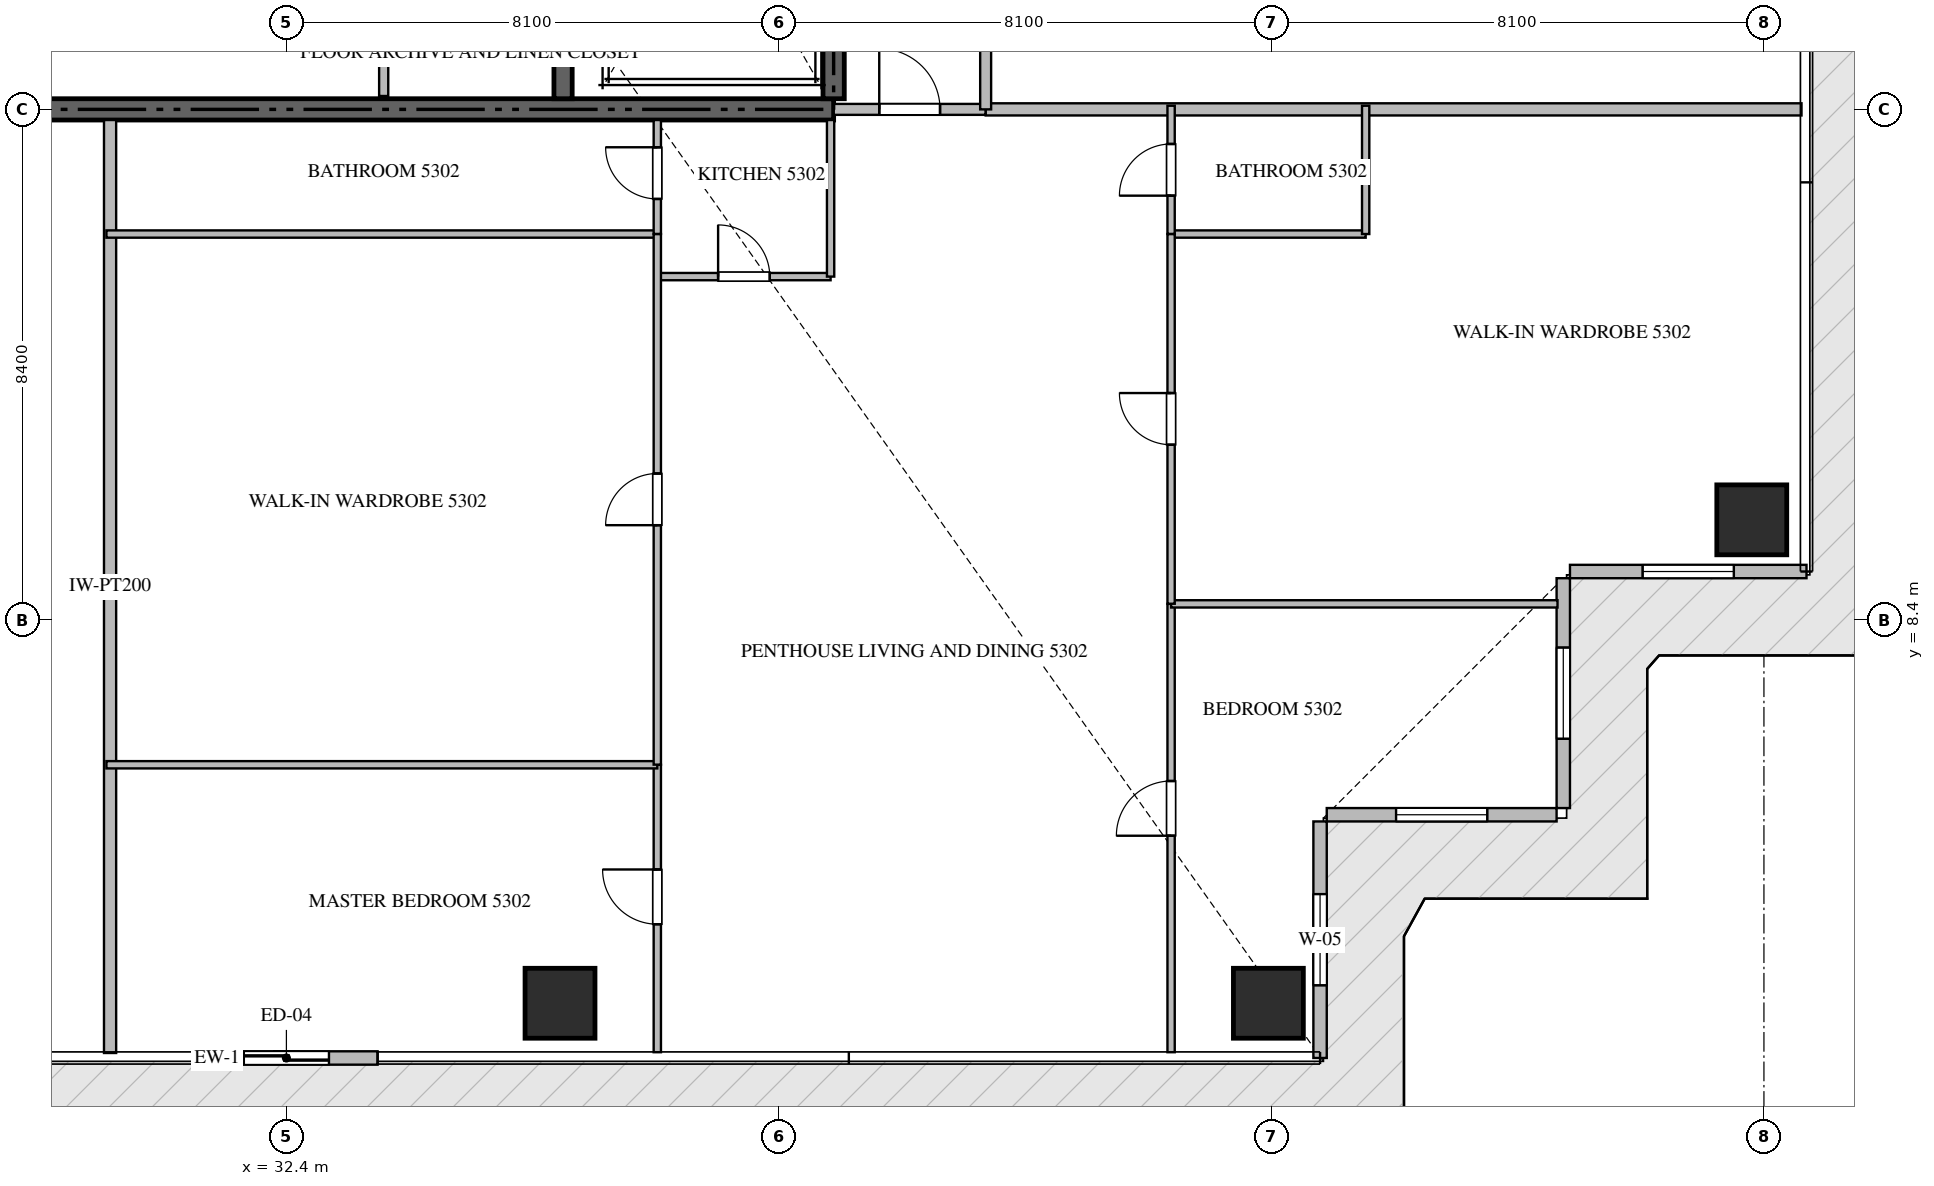
"""IFC4 building model, lengths in metres.
Left out: names, types, materials, properties, quantities, classifications, styles, units other than length and angle.
Written with IfcOpenShell. Run it as: python <this file> out.ifc"""

import sys

from ifc_helpers import new_model, si_unit, direction, frame, frame_2d, origin, origin_2d, place, context, subcontext, project, spatial, rectangle, extrude, source, transform, mapped, element, fill, save


model = new_model("IFC4")
c1 = context("Model", 3, precision=1e-05, world=origin(), true_north=direction((0.0, 1.0)))
c2 = subcontext(c1, "Body", "Model", "MODEL_VIEW")
j1 = project(units=[si_unit("LENGTHUNIT", "METRE"), si_unit("PLANEANGLEUNIT", "RADIAN")], contexts=[c1])
p1 = place(None, origin())
s1 = spatial("IfcSite", under=j1, at=p1, CompositionType="ELEMENT")
p2 = place(p1, origin())
s2 = spatial("IfcBuilding", under=s1, at=p2, CompositionType="ELEMENT")
p3 = place(p2, frame((0.0, 0.0, 214.3)))
s3 = spatial("IfcBuildingStorey", under=s2, at=p3, CompositionType="ELEMENT", Elevation=214.3)
p4 = place(p3, frame((23.4, 16.8, -0.26), z_axis=(0.0, 0.0, 1.0), x_axis=(1.0, 0.0, 0.0)))
e1 = element("IfcWall", 1, at=p4, inside=s3, PredefinedType="SHEAR", context=c2, shape_type="SweptSolid", body=[
    extrude(rectangle(XDim=18.0, YDim=0.35, at=frame_2d((9.0, 0.0))), origin(), (0.0, 0.0, 1.0), 3.848),
])
p5 = place(p3, frame((41.4, 16.975, -0.26), z_axis=(0.0, 0.0, 1.0), x_axis=(0.0, 1.0, 0.0)))
e2 = element("IfcWall", 2, at=p5, inside=s3, PredefinedType="SHEAR", context=c2, shape_type="SweptSolid", body=[
    extrude(rectangle(XDim=8.375, YDim=0.35, at=frame_2d((4.188, 0.0))), origin(), (0.0, 0.0, 1.0), 3.848),
])
p6 = place(p3, frame((36.95, 16.975, -0.26), z_axis=(0.0, 0.0, 1.0), x_axis=(0.0, 1.0, 0.0)))
e3 = element("IfcWall", 3, at=p6, inside=s3, PredefinedType="SHEAR", context=c2, shape_type="SweptSolid", body=[
    extrude(rectangle(XDim=8.375, YDim=0.3, at=frame_2d((4.188, 0.0))), origin(), (0.0, 0.0, 1.0), 3.848),
])
m1 = source(origin(), c2, "Body", "SweptSolid", [
    extrude(rectangle(XDim=1.15, YDim=1.15, at=origin_2d()), origin(), (0.0, 0.0, 1.0), 3.85),
])
for number, where, z_axis, x_axis in (
    (4, (36.9, 2.1, -0.26), (0.0, 0.0, 1.0), (1.0, 0.0, 0.0)),
    (5, (48.55, 2.1, -0.26), (0.0, 0.0, 1.0), (1.0, 0.0, 0.0)),
    (6, (56.5, 10.05, -0.26), (0.0, 0.0, 1.0), (1.0, 0.0, 0.0)),
):
    element("IfcColumn", number, at=place(p3, frame(where, z_axis=z_axis, x_axis=x_axis)), inside=s3, PredefinedType="COLUMN", context=c2, shape_type="MappedRepresentation", body=[
        mapped(m1, transform((0.0, 0.0, 0.0), scale=1.0)),
    ])
p7 = place(p3, frame((30.9, 1.2, 0.0), z_axis=(0.0, 0.0, 1.0), x_axis=(1.0, 0.0, 0.0)))
e7 = element("IfcWall", 7, at=p7, inside=s3, PredefinedType="ELEMENTEDWALL", context=c2, shape_type="SweptSolid", body=[
    extrude(rectangle(XDim=3.0, YDim=0.22, at=frame_2d((1.5, 0.0))), origin(), (0.0, 0.0, 1.0), 3.575),
])
p8 = place(p7, frame((0.8, 0.0, 0.0)))
e8 = element("IfcOpeningElement", 8, at=p8, cuts=e7, PredefinedType="OPENING", context=c2, shape_type="SweptSolid", body=[
    extrude(rectangle(XDim=1.4, YDim=2.25, at=frame_2d((0.7, 1.125))), frame((0.0, 0.12, 0.0), z_axis=(0.0, -1.0, 0.0), x_axis=(1.0, 0.0, 0.0)), (0.0, 0.0, 1.0), 0.24),
])
p9 = place(p3, frame((49.4, 1.2, 0.0), z_axis=(0.0, 0.0, 1.0), x_axis=(0.0, 1.0, 0.0)))
e9 = element("IfcWall", 9, at=p9, inside=s3, PredefinedType="ELEMENTEDWALL", context=c2, shape_type="SweptSolid", body=[
    extrude(rectangle(XDim=3.89, YDim=0.22, at=frame_2d((1.945, 0.0))), origin(), (0.0, 0.0, 1.0), 3.575),
])
p10 = place(p9, frame((1.195, 0.0, 0.65)))
e10 = element("IfcOpeningElement", 10, at=p10, cuts=e9, PredefinedType="OPENING", context=c2, shape_type="SweptSolid", body=[
    extrude(rectangle(XDim=1.5, YDim=2.25, at=frame_2d((0.75, 1.125))), frame((0.0, 0.12, 0.0), z_axis=(0.0, -1.0, 0.0), x_axis=(1.0, 0.0, 0.0)), (0.0, 0.0, 1.0), 0.24),
])
p11 = place(p3, frame((49.51, 5.2, 0.0), z_axis=(0.0, 0.0, 1.0), x_axis=(1.0, 0.0, 0.0)))
e11 = element("IfcWall", 11, at=p11, inside=s3, PredefinedType="ELEMENTEDWALL", context=c2, shape_type="SweptSolid", body=[
    extrude(rectangle(XDim=3.78, YDim=0.22, at=frame_2d((1.89, 0.0))), origin(), (0.0, 0.0, 1.0), 3.575),
])
p12 = place(p11, frame((1.14, 0.0, 0.65)))
e12 = element("IfcOpeningElement", 12, at=p12, cuts=e11, PredefinedType="OPENING", context=c2, shape_type="SweptSolid", body=[
    extrude(rectangle(XDim=1.5, YDim=2.25, at=frame_2d((0.75, 1.125))), frame((0.0, 0.12, 0.0), z_axis=(0.0, -1.0, 0.0), x_axis=(1.0, 0.0, 0.0)), (0.0, 0.0, 1.0), 0.24),
])
p13 = place(p3, frame((53.4, 5.31, 0.0), z_axis=(0.0, 0.0, 1.0), x_axis=(0.0, 1.0, 0.0)))
e13 = element("IfcWall", 13, at=p13, inside=s3, PredefinedType="ELEMENTEDWALL", context=c2, shape_type="SweptSolid", body=[
    extrude(rectangle(XDim=3.78, YDim=0.22, at=frame_2d((1.89, 0.0))), origin(), (0.0, 0.0, 1.0), 3.575),
])
p14 = place(p13, frame((1.14, 0.0, 0.65)))
e14 = element("IfcOpeningElement", 14, at=p14, cuts=e13, PredefinedType="OPENING", context=c2, shape_type="SweptSolid", body=[
    extrude(rectangle(XDim=1.5, YDim=2.25, at=frame_2d((0.75, 1.125))), frame((0.0, 0.12, 0.0), z_axis=(0.0, -1.0, 0.0), x_axis=(1.0, 0.0, 0.0)), (0.0, 0.0, 1.0), 0.24),
])
p15 = place(p3, frame((53.51, 9.2, 0.0), z_axis=(0.0, 0.0, 1.0), x_axis=(1.0, 0.0, 0.0)))
e15 = element("IfcWall", 15, at=p15, inside=s3, PredefinedType="ELEMENTEDWALL", context=c2, shape_type="SweptSolid", body=[
    extrude(rectangle(XDim=3.89, YDim=0.22, at=frame_2d((1.945, 0.0))), origin(), (0.0, 0.0, 1.0), 3.575),
])
p16 = place(p15, frame((1.195, 0.0, 0.65)))
e16 = element("IfcOpeningElement", 16, at=p16, cuts=e15, PredefinedType="OPENING", context=c2, shape_type="SweptSolid", body=[
    extrude(rectangle(XDim=1.5, YDim=2.25, at=frame_2d((0.75, 1.125))), frame((0.0, 0.12, 0.0), z_axis=(0.0, -1.0, 0.0), x_axis=(1.0, 0.0, 0.0)), (0.0, 0.0, 1.0), 0.24),
])
p17 = place(p3, frame((34.0, 17.02, 0.0), z_axis=(0.0, 0.0, 1.0), x_axis=(0.0, 1.0, 0.0)))
e17 = element("IfcWall", 17, at=p17, inside=s3, PredefinedType="PARTITIONING", context=c2, shape_type="SweptSolid", body=[
    extrude(rectangle(XDim=2.73, YDim=0.15, at=frame_2d((1.365, 0.0))), origin(), (0.0, 0.0, 1.0), 3.59),
])
p18 = place(p3, frame((29.5, 1.282, 0.0), z_axis=(0.0, 0.0, 1.0), x_axis=(0.0, 1.0, 0.0)))
e18 = element("IfcWall", 18, at=p18, inside=s3, PredefinedType="PARTITIONING", context=c2, shape_type="SweptSolid", body=[
    extrude(rectangle(XDim=15.343, YDim=0.2, at=frame_2d((7.671, 0.0))), origin(), (0.0, 0.0, 1.0), 3.59),
])
p19 = place(p3, frame((43.9, 16.8, 0.0), z_axis=(0.0, 0.0, 1.0), x_axis=(1.0, 0.0, 0.0)))
e19 = element("IfcWall", 19, at=p19, inside=s3, PredefinedType="PARTITIONING", context=c2, shape_type="SweptSolid", body=[
    extrude(rectangle(XDim=13.418, YDim=0.2, at=frame_2d((6.709, 0.0))), origin(), (0.0, 0.0, 1.0), 3.59),
])
p20 = place(p3, frame((41.402, 16.8, 0.0), z_axis=(0.0, 0.0, 1.0), x_axis=(1.0, 0.0, 0.0)))
e20 = element("IfcWall", 20, at=p20, inside=s3, PredefinedType="PARTITIONING", context=c2, shape_type="SweptSolid", body=[
    extrude(rectangle(XDim=2.496, YDim=0.18, at=frame_2d((1.248, 0.0))), origin(), (0.0, 0.0, 1.0), 3.59),
])
p21 = place(p20, frame((0.748, 0.0, 0.0)))
e21 = element("IfcOpeningElement", 21, at=p21, cuts=e20, PredefinedType="OPENING", context=c2, shape_type="SweptSolid", body=[
    extrude(rectangle(XDim=1.0, YDim=2.15, at=frame_2d((0.5, 1.075))), frame((0.0, 0.1, 0.0), z_axis=(0.0, -1.0, 0.0), x_axis=(1.0, 0.0, 0.0)), (0.0, 0.0, 1.0), 0.2),
])
p22 = place(p3, frame((43.9, 16.8, 0.0), z_axis=(0.0, 0.0, 1.0), x_axis=(0.0, 1.0, 0.0)))
e22 = element("IfcWall", 22, at=p22, inside=s3, PredefinedType="PARTITIONING", context=c2, shape_type="SweptSolid", body=[
    extrude(rectangle(XDim=16.8, YDim=0.18, at=frame_2d((8.4, 0.0))), origin(), (0.0, 0.0, 1.0), 3.59),
])
p23 = place(p22, frame((1.3, 0.0, 0.0)))
e23 = element("IfcOpeningElement", 23, at=p23, cuts=e22, PredefinedType="OPENING", context=c2, shape_type="SweptSolid", body=[
    extrude(rectangle(XDim=1.0, YDim=2.15, at=frame_2d((0.5, 1.075))), frame((0.0, 0.1, 0.0), z_axis=(0.0, -1.0, 0.0), x_axis=(1.0, 0.0, 0.0)), (0.0, 0.0, 1.0), 0.2),
])
p24 = place(p3, frame((38.5, 14.05, 0.0), z_axis=(0.0, 0.0, 1.0), x_axis=(1.0, 0.0, 0.0)))
e24 = element("IfcWall", 24, at=p24, inside=s3, PredefinedType="PARTITIONING", context=c2, shape_type="SweptSolid", body=[
    extrude(rectangle(XDim=2.85, YDim=0.12, at=frame_2d((1.425, 0.0))), origin(), (0.0, 0.0, 1.0), 3.59),
])
p25 = place(p24, frame((1.0, 0.0, 0.0)))
e25 = element("IfcOpeningElement", 25, at=p25, cuts=e24, PredefinedType="OPENING", context=c2, shape_type="SweptSolid", body=[
    extrude(rectangle(XDim=0.85, YDim=2.1, at=frame_2d((0.425, 1.05))), frame((0.0, 0.07, 0.0), z_axis=(0.0, -1.0, 0.0), x_axis=(1.0, 0.0, 0.0)), (0.0, 0.0, 1.0), 0.14),
])
p26 = place(p3, frame((41.35, 14.05, 0.0), z_axis=(0.0, 0.0, 1.0), x_axis=(0.0, 1.0, 0.0)))
e26 = element("IfcWall", 26, at=p26, inside=s3, PredefinedType="PARTITIONING", context=c2, shape_type="SweptSolid", body=[
    extrude(rectangle(XDim=2.575, YDim=0.12, at=frame_2d((1.288, 0.0))), origin(), (0.0, 0.0, 1.0), 3.59),
])
p27 = place(p3, frame((38.5, 1.295, 0.0), z_axis=(0.0, 0.0, 1.0), x_axis=(0.0, 1.0, 0.0)))
e27 = element("IfcWall", 27, at=p27, inside=s3, PredefinedType="PARTITIONING", context=c2, shape_type="SweptSolid", body=[
    extrude(rectangle(XDim=4.727, YDim=0.12, at=frame_2d((2.364, 0.0))), origin(), (0.0, 0.0, 1.0), 3.59),
])
p28 = place(p27, frame((2.105, 0.0, 0.0)))
e28 = element("IfcOpeningElement", 28, at=p28, cuts=e27, PredefinedType="OPENING", context=c2, shape_type="SweptSolid", body=[
    extrude(rectangle(XDim=0.9, YDim=2.1, at=frame_2d((0.45, 1.05))), frame((0.0, 0.07, 0.0), z_axis=(0.0, -1.0, 0.0), x_axis=(1.0, 0.0, 0.0)), (0.0, 0.0, 1.0), 0.14),
])
for number, where, z_axis, x_axis in (
    (29, (29.44, 6.022, 0.0), (0.0, 0.0, 1.0), (1.0, 0.0, 0.0)),
    (30, (29.44, 14.75, 0.0), (0.0, 0.0, 1.0), (1.0, 0.0, 0.0)),
):
    element("IfcWall", number, at=place(p3, frame(where, z_axis=z_axis, x_axis=x_axis)), inside=s3, PredefinedType="PARTITIONING", context=c2, shape_type="SweptSolid", body=[
        extrude(rectangle(XDim=9.06, YDim=0.12, at=frame_2d((4.53, 0.0))), origin(), (0.0, 0.0, 1.0), 3.59),
    ])
p29 = place(p3, frame((38.5, 6.024, 0.0), z_axis=(0.0, 0.0, 1.0), x_axis=(0.0, 1.0, 0.0)))
e31 = element("IfcWall", 31, at=p29, inside=s3, PredefinedType="PARTITIONING", context=c2, shape_type="SweptSolid", body=[
    extrude(rectangle(XDim=8.726, YDim=0.12, at=frame_2d((4.363, 0.0))), origin(), (0.0, 0.0, 1.0), 3.59),
])
p30 = place(p29, frame((3.938, 0.0, 0.0)))
e32 = element("IfcOpeningElement", 32, at=p30, cuts=e31, PredefinedType="OPENING", context=c2, shape_type="SweptSolid", body=[
    extrude(rectangle(XDim=0.85, YDim=2.1, at=frame_2d((0.425, 1.05))), frame((0.0, 0.07, 0.0), z_axis=(0.0, -1.0, 0.0), x_axis=(1.0, 0.0, 0.0)), (0.0, 0.0, 1.0), 0.14),
])
p31 = place(p3, frame((38.5, 14.752, 0.0), z_axis=(0.0, 0.0, 1.0), x_axis=(0.0, 1.0, 0.0)))
e33 = element("IfcWall", 33, at=p31, inside=s3, PredefinedType="PARTITIONING", context=c2, shape_type="SweptSolid", body=[
    extrude(rectangle(XDim=1.873, YDim=0.12, at=frame_2d((0.937, 0.0))), origin(), (0.0, 0.0, 1.0), 3.59),
])
p32 = place(p31, frame((0.575, 0.0, 0.0)))
e34 = element("IfcOpeningElement", 34, at=p32, cuts=e33, PredefinedType="OPENING", context=c2, shape_type="SweptSolid", body=[
    extrude(rectangle(XDim=0.85, YDim=2.1, at=frame_2d((0.425, 1.05))), frame((0.0, 0.07, 0.0), z_axis=(0.0, -1.0, 0.0), x_axis=(1.0, 0.0, 0.0)), (0.0, 0.0, 1.0), 0.14),
])
p33 = place(p3, frame((46.95, 1.295, 0.0), z_axis=(0.0, 0.0, 1.0), x_axis=(0.0, 1.0, 0.0)))
e35 = element("IfcWall", 35, at=p33, inside=s3, PredefinedType="PARTITIONING", context=c2, shape_type="SweptSolid", body=[
    extrude(rectangle(XDim=7.373, YDim=0.12, at=frame_2d((3.687, 0.0))), origin(), (0.0, 0.0, 1.0), 3.59),
])
p34 = place(p33, frame((3.56, 0.0, 0.0)))
e36 = element("IfcOpeningElement", 36, at=p34, cuts=e35, PredefinedType="OPENING", context=c2, shape_type="SweptSolid", body=[
    extrude(rectangle(XDim=0.9, YDim=2.1, at=frame_2d((0.45, 1.05))), frame((0.0, 0.07, 0.0), z_axis=(0.0, -1.0, 0.0), x_axis=(1.0, 0.0, 0.0)), (0.0, 0.0, 1.0), 0.14),
])
p35 = place(p3, frame((46.95, 8.668, 0.0), z_axis=(0.0, 0.0, 1.0), x_axis=(1.0, 0.0, 0.0)))
e37 = element("IfcWall", 37, at=p35, inside=s3, PredefinedType="PARTITIONING", context=c2, shape_type="SweptSolid", body=[
    extrude(rectangle(XDim=6.355, YDim=0.12, at=frame_2d((3.177, 0.0))), origin(), (0.0, 0.0, 1.0), 3.59),
])
p36 = place(p3, frame((46.95, 14.75, 0.0), z_axis=(0.0, 0.0, 1.0), x_axis=(1.0, 0.0, 0.0)))
e38 = element("IfcWall", 38, at=p36, inside=s3, PredefinedType="PARTITIONING", context=c2, shape_type="SweptSolid", body=[
    extrude(rectangle(XDim=3.2, YDim=0.12, at=frame_2d((1.6, 0.0))), origin(), (0.0, 0.0, 1.0), 3.59),
])
p37 = place(p3, frame((50.15, 14.75, 0.0), z_axis=(0.0, 0.0, 1.0), x_axis=(0.0, 1.0, 0.0)))
e39 = element("IfcWall", 39, at=p37, inside=s3, PredefinedType="PARTITIONING", context=c2, shape_type="SweptSolid", body=[
    extrude(rectangle(XDim=2.11, YDim=0.12, at=frame_2d((1.055, 0.0))), origin(), (0.0, 0.0, 1.0), 3.59),
])
p38 = place(p3, frame((46.95, 8.67, 0.0), z_axis=(0.0, 0.0, 1.0), x_axis=(0.0, 1.0, 0.0)))
e40 = element("IfcWall", 40, at=p38, inside=s3, PredefinedType="PARTITIONING", context=c2, shape_type="SweptSolid", body=[
    extrude(rectangle(XDim=6.08, YDim=0.12, at=frame_2d((3.04, 0.0))), origin(), (0.0, 0.0, 1.0), 3.59),
])
p39 = place(p38, frame((2.615, 0.0, 0.0)))
e41 = element("IfcOpeningElement", 41, at=p39, cuts=e40, PredefinedType="OPENING", context=c2, shape_type="SweptSolid", body=[
    extrude(rectangle(XDim=0.85, YDim=2.1, at=frame_2d((0.425, 1.05))), frame((0.0, 0.07, 0.0), z_axis=(0.0, -1.0, 0.0), x_axis=(1.0, 0.0, 0.0)), (0.0, 0.0, 1.0), 0.14),
])
p40 = place(p3, frame((46.95, 14.752, 0.0), z_axis=(0.0, 0.0, 1.0), x_axis=(0.0, 1.0, 0.0)))
e42 = element("IfcWall", 42, at=p40, inside=s3, PredefinedType="PARTITIONING", context=c2, shape_type="SweptSolid", body=[
    extrude(rectangle(XDim=2.108, YDim=0.12, at=frame_2d((1.054, 0.0))), origin(), (0.0, 0.0, 1.0), 3.59),
])
p41 = place(p40, frame((0.629, 0.0, 0.0)))
e43 = element("IfcOpeningElement", 43, at=p41, cuts=e42, PredefinedType="OPENING", context=c2, shape_type="SweptSolid", body=[
    extrude(rectangle(XDim=0.85, YDim=2.1, at=frame_2d((0.425, 1.05))), frame((0.0, 0.07, 0.0), z_axis=(0.0, -1.0, 0.0), x_axis=(1.0, 0.0, 0.0)), (0.0, 0.0, 1.0), 0.14),
])
m2 = source(origin(), c2, "Body", "SweptSolid", [
    extrude(rectangle(XDim=1.4, YDim=2.25, at=frame_2d((0.7, 1.125))), frame((0.0, 0.025, 0.0), z_axis=(0.0, -1.0, 0.0), x_axis=(1.0, 0.0, 0.0)), (0.0, 0.0, 1.0), 0.05),
])
p42 = place(p8, origin())
e44 = element("IfcDoor", 44, at=p42, inside=s3, OperationType="SLIDING_TO_LEFT", PredefinedType="DOOR", context=c2, shape_type="MappedRepresentation", body=[
    mapped(m2, transform((0.0, 0.0, 0.0), scale=1.0)),
])
fill(e8, e44)
m3 = source(origin(), c2, "Body", "SweptSolid", [
    extrude(rectangle(XDim=1.5, YDim=2.25, at=frame_2d((0.75, 1.125))), frame((0.0, 0.03, 0.0), z_axis=(0.0, -1.0, 0.0), x_axis=(1.0, 0.0, 0.0)), (0.0, 0.0, 1.0), 0.06),
])
p43 = place(p10, origin())
e45 = element("IfcWindow", 45, at=p43, inside=s3, PartitioningType="SINGLE_PANEL", PredefinedType="WINDOW", context=c2, shape_type="MappedRepresentation", body=[
    mapped(m3, transform((0.0, 0.0, 0.0), scale=1.0)),
])
fill(e10, e45)
p44 = place(p12, origin())
e46 = element("IfcWindow", 46, at=p44, inside=s3, PartitioningType="SINGLE_PANEL", PredefinedType="WINDOW", context=c2, shape_type="MappedRepresentation", body=[
    mapped(m3, transform((0.0, 0.0, 0.0), scale=1.0)),
])
fill(e12, e46)
p45 = place(p14, origin())
e47 = element("IfcWindow", 47, at=p45, inside=s3, PartitioningType="SINGLE_PANEL", PredefinedType="WINDOW", context=c2, shape_type="MappedRepresentation", body=[
    mapped(m3, transform((0.0, 0.0, 0.0), scale=1.0)),
])
fill(e14, e47)
p46 = place(p16, origin())
e48 = element("IfcWindow", 48, at=p46, inside=s3, PartitioningType="SINGLE_PANEL", PredefinedType="WINDOW", context=c2, shape_type="MappedRepresentation", body=[
    mapped(m3, transform((0.0, 0.0, 0.0), scale=1.0)),
])
fill(e16, e48)
m4 = source(origin(), c2, "Body", "SweptSolid", [
    extrude(rectangle(XDim=1.0, YDim=2.15, at=frame_2d((0.5, 1.075))), frame((0.0, 0.025, 0.0), z_axis=(0.0, -1.0, 0.0), x_axis=(1.0, 0.0, 0.0)), (0.0, 0.0, 1.0), 0.05),
])
p47 = place(p21, origin())
e49 = element("IfcDoor", 49, at=p47, inside=s3, OperationType="SINGLE_SWING_LEFT", PredefinedType="DOOR", context=c2, shape_type="MappedRepresentation", body=[
    mapped(m4, transform((0.0, 0.0, 0.0), scale=1.0)),
])
fill(e21, e49)
m5 = source(origin(), c2, "Body", "SweptSolid", [
    extrude(rectangle(XDim=0.85, YDim=2.1, at=frame_2d((0.425, 1.05))), frame((0.0, 0.025, 0.0), z_axis=(0.0, -1.0, 0.0), x_axis=(1.0, 0.0, 0.0)), (0.0, 0.0, 1.0), 0.05),
])
p48 = place(p25, origin())
e50 = element("IfcDoor", 50, at=p48, inside=s3, OperationType="SINGLE_SWING_LEFT", PredefinedType="DOOR", context=c2, shape_type="MappedRepresentation", body=[
    mapped(m5, transform((0.0, 0.0, 0.0), scale=1.0)),
])
fill(e25, e50)
m6 = source(origin(), c2, "Body", "SweptSolid", [
    extrude(rectangle(XDim=0.9, YDim=2.1, at=frame_2d((0.45, 1.05))), frame((0.0, 0.025, 0.0), z_axis=(0.0, -1.0, 0.0), x_axis=(1.0, 0.0, 0.0)), (0.0, 0.0, 1.0), 0.05),
])
p49 = place(p28, origin())
e51 = element("IfcDoor", 51, at=p49, inside=s3, OperationType="SINGLE_SWING_RIGHT", PredefinedType="DOOR", context=c2, shape_type="MappedRepresentation", body=[
    mapped(m6, transform((0.0, 0.0, 0.0), scale=1.0)),
])
fill(e28, e51)
p50 = place(p30, origin())
e52 = element("IfcDoor", 52, at=p50, inside=s3, OperationType="SINGLE_SWING_LEFT", PredefinedType="DOOR", context=c2, shape_type="MappedRepresentation", body=[
    mapped(m5, transform((0.0, 0.0, 0.0), scale=1.0)),
])
fill(e32, e52)
p51 = place(p32, origin())
e53 = element("IfcDoor", 53, at=p51, inside=s3, OperationType="SINGLE_SWING_RIGHT", PredefinedType="DOOR", context=c2, shape_type="MappedRepresentation", body=[
    mapped(m5, transform((0.0, 0.0, 0.0), scale=1.0)),
])
fill(e34, e53)
p52 = place(p34, origin())
e54 = element("IfcDoor", 54, at=p52, inside=s3, OperationType="SINGLE_SWING_LEFT", PredefinedType="DOOR", context=c2, shape_type="MappedRepresentation", body=[
    mapped(m6, transform((0.0, 0.0, 0.0), scale=1.0)),
])
fill(e36, e54)
p53 = place(p39, origin())
e55 = element("IfcDoor", 55, at=p53, inside=s3, OperationType="SINGLE_SWING_RIGHT", PredefinedType="DOOR", context=c2, shape_type="MappedRepresentation", body=[
    mapped(m5, transform((0.0, 0.0, 0.0), scale=1.0)),
])
fill(e41, e55)
p54 = place(p41, origin())
e56 = element("IfcDoor", 56, at=p54, inside=s3, OperationType="SINGLE_SWING_LEFT", PredefinedType="DOOR", context=c2, shape_type="MappedRepresentation", body=[
    mapped(m5, transform((0.0, 0.0, 0.0), scale=1.0)),
])
fill(e43, e56)
save(model, sys.argv[1])
